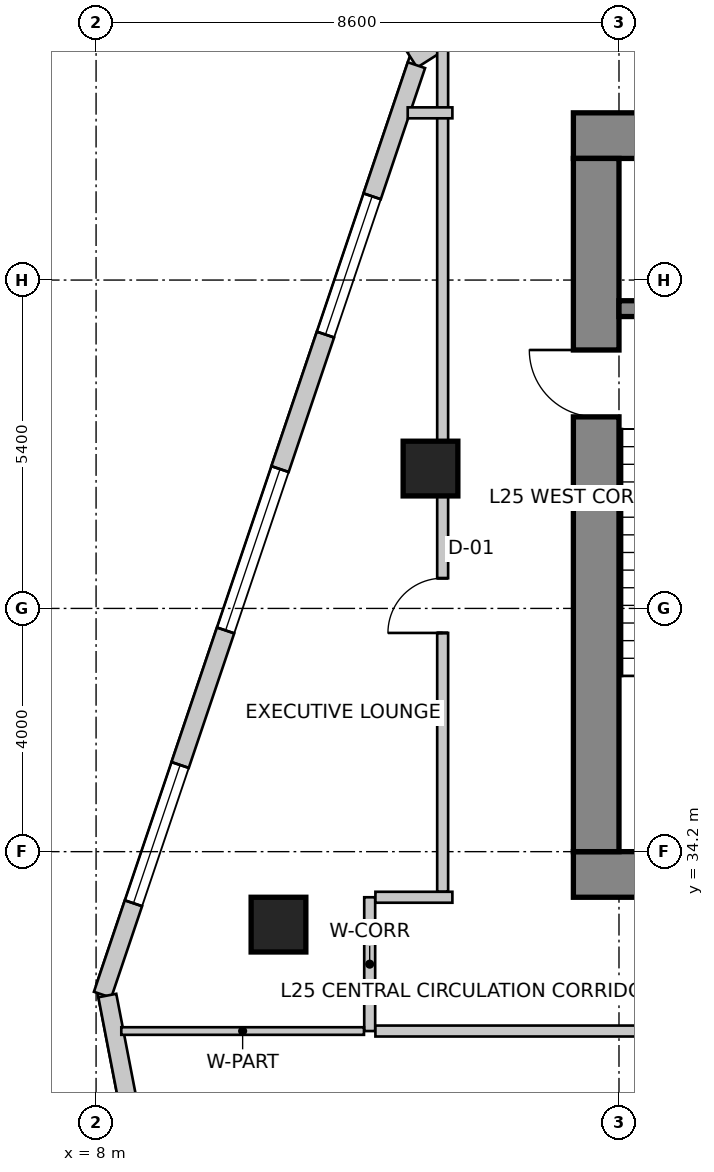
"""IFC4 building model, lengths in metres.
Left out: names, types, materials, properties, quantities, classifications, styles, units other than length and angle.
Written with IfcOpenShell. Run it as: python <this file> out.ifc"""

import sys

from ifc_helpers import new_model, si_unit, direction, frame, frame_2d, origin, origin_2d, place, context, subcontext, project, spatial, rectangle, extrude, source, transform, mapped, element, fill, save


model = new_model("IFC4")
c1 = context("Model", 3, precision=1e-05, world=origin(), true_north=direction((0.0, 1.0)))
c2 = subcontext(c1, "Body", "Model", "MODEL_VIEW")
j1 = project(units=[si_unit("LENGTHUNIT", "METRE"), si_unit("PLANEANGLEUNIT", "RADIAN")], contexts=[c1])
p1 = place(None, origin())
s1 = spatial("IfcSite", under=j1, at=p1, CompositionType="ELEMENT")
p2 = place(p1, origin())
s2 = spatial("IfcBuilding", under=s1, at=p2, CompositionType="ELEMENT")
p3 = place(p2, frame((0.0, 0.0, 105.4)))
s3 = spatial("IfcBuildingStorey", under=s2, at=p3, CompositionType="ELEMENT", Elevation=105.4)
p4 = place(p3, frame((15.85, 45.975, 0.0), z_axis=(0.0, 0.0, 1.0), x_axis=(1.0, 0.0, 0.0)))
e1 = element("IfcWall", 1, at=p4, inside=s3, PredefinedType="SHEAR", context=c2, shape_type="SweptSolid", body=[
    extrude(rectangle(XDim=15.9, YDim=0.75, at=frame_2d((7.95, 0.0))), origin(), (0.0, 0.0, 1.0), 5.2),
])
p5 = place(p3, frame((15.85, 33.825, 0.0), z_axis=(0.0, 0.0, 1.0), x_axis=(1.0, 0.0, 0.0)))
e2 = element("IfcWall", 2, at=p5, inside=s3, PredefinedType="SHEAR", context=c2, shape_type="SweptSolid", body=[
    extrude(rectangle(XDim=15.9, YDim=0.75, at=frame_2d((7.95, 0.0))), origin(), (0.0, 0.0, 1.0), 5.2),
])
m1 = source(origin(), c2, "Body", "SweptSolid", [
    extrude(rectangle(XDim=1.3, YDim=2.15, at=frame_2d((0.65, 1.075))), frame((0.0, 0.385, 0.0), z_axis=(0.0, -1.0, 0.0), x_axis=(1.0, 0.0, 0.0)), (0.0, 0.0, 1.0), 0.77),
])
p6 = place(p5, frame((10.08, 0.0, 0.0)))
e3 = element("IfcOpeningElement", 3, at=p6, cuts=e2, PredefinedType="OPENING", context=c2, shape_type="MappedRepresentation", body=[
    mapped(m1, transform((0.0, 0.0, 0.0), scale=1.0)),
])
p7 = place(p3, frame((16.225, 34.2, 0.0), z_axis=(0.0, 0.0, 1.0), x_axis=(0.0, 1.0, 0.0)))
e4 = element("IfcWall", 4, at=p7, inside=s3, PredefinedType="SHEAR", context=c2, shape_type="SweptSolid", body=[
    extrude(rectangle(XDim=11.4, YDim=0.75, at=frame_2d((5.7, 0.0))), origin(), (0.0, 0.0, 1.0), 5.2),
])
m2 = source(origin(), c2, "Body", "SweptSolid", [
    extrude(rectangle(XDim=1.1, YDim=2.15, at=frame_2d((0.55, 1.075))), frame((0.0, 0.385, 0.0), z_axis=(0.0, -1.0, 0.0), x_axis=(1.0, 0.0, 0.0)), (0.0, 0.0, 1.0), 0.77),
])
p8 = place(p7, frame((7.15, 0.0, 0.0)))
e5 = element("IfcOpeningElement", 5, at=p8, cuts=e4, PredefinedType="OPENING", context=c2, shape_type="MappedRepresentation", body=[
    mapped(m2, transform((0.0, 0.0, 0.0), scale=1.0)),
])
p9 = place(p3, frame((16.6, 43.13, 0.0), z_axis=(0.0, 0.0, 1.0), x_axis=(1.0, 0.0, 0.0)))
e6 = element("IfcWall", 6, at=p9, inside=s3, PredefinedType="SHEAR", context=c2, shape_type="SweptSolid", body=[
    extrude(rectangle(XDim=3.5, YDim=0.26, at=frame_2d((1.75, 0.0))), origin(), (0.0, 0.0, 1.0), 5.2),
])
m3 = source(origin(), c2, "Body", "SweptSolid", [
    extrude(rectangle(XDim=0.9, YDim=0.9, at=origin_2d()), origin(), (0.0, 0.0, 1.0), 5.2),
])
for number, where, z_axis, x_axis in (
    (7, (11.0, 33.0, 0.0), (0.0, 0.0, 1.0), (1.0, 0.0, 0.0)),
    (8, (13.5, 40.5, 0.0), (0.0, 0.0, 1.0), (1.0, 0.0, 0.0)),
):
    element("IfcColumn", number, at=place(p3, frame(where, z_axis=z_axis, x_axis=x_axis)), inside=s3, PredefinedType="COLUMN", context=c2, shape_type="MappedRepresentation", body=[
        mapped(m3, transform((0.0, 0.0, 0.0), scale=1.0)),
    ])
p10 = place(p3, frame((21.875, 52.742, 0.0), z_axis=(0.0, 0.0, 1.0), x_axis=(-0.843662465249, -0.536873956092, 0.0)))
e9 = element("IfcWall", 9, at=p10, inside=s3, PredefinedType="SOLIDWALL", context=c2, shape_type="SweptSolid", body=[
    extrude(rectangle(XDim=10.284, YDim=0.3, at=frame_2d((5.142, 0.0))), origin(), (0.0, 0.0, 1.0), 4.95),
])
m4 = source(origin(), c2, "Body", "SweptSolid", [
    extrude(rectangle(XDim=2.8, YDim=2.4, at=frame_2d((1.4, 1.2))), frame((0.0, 0.16, 0.0), z_axis=(0.0, -1.0, 0.0), x_axis=(1.0, 0.0, 0.0)), (0.0, 0.0, 1.0), 0.32),
])
p11 = place(p10, frame((2.456, 0.0, 0.85)))
e10 = element("IfcOpeningElement", 10, at=p11, cuts=e9, PredefinedType="OPENING", context=c2, shape_type="MappedRepresentation", body=[
    mapped(m4, transform((0.0, 0.0, 0.0), scale=1.0)),
])
m5 = source(origin(), c2, "Body", "SweptSolid", [
    extrude(rectangle(XDim=1.5, YDim=1.8, at=frame_2d((0.75, 0.9))), frame((0.0, 0.16, 0.0), z_axis=(0.0, -1.0, 0.0), x_axis=(1.0, 0.0, 0.0)), (0.0, 0.0, 1.0), 0.32),
])
p12 = place(p10, frame((7.937, 0.0, 0.85)))
e11 = element("IfcOpeningElement", 11, at=p12, cuts=e9, PredefinedType="OPENING", context=c2, shape_type="MappedRepresentation", body=[
    mapped(m5, transform((0.0, 0.0, 0.0), scale=1.0)),
])
p13 = place(p3, frame((13.269, 47.134, 0.0), z_axis=(0.0, 0.0, 1.0), x_axis=(-0.319929596295, -0.947441319246, 0.0)))
e12 = element("IfcWall", 12, at=p13, inside=s3, PredefinedType="SOLIDWALL", context=c2, shape_type="SweptSolid", body=[
    extrude(rectangle(XDim=16.134, YDim=0.3, at=frame_2d((8.067, 0.0))), origin(), (0.0, 0.0, 1.0), 4.95),
])
m6 = source(origin(), c2, "Body", "SweptSolid", [
    extrude(rectangle(XDim=2.4, YDim=2.2, at=frame_2d((1.2, 1.1))), frame((0.0, 0.16, 0.0), z_axis=(0.0, -1.0, 0.0), x_axis=(1.0, 0.0, 0.0)), (0.0, 0.0, 1.0), 0.32),
])
p14 = place(p13, frame((2.276, 0.0, 0.85)))
e13 = element("IfcOpeningElement", 13, at=p14, cuts=e12, PredefinedType="OPENING", context=c2, shape_type="MappedRepresentation", body=[
    mapped(m6, transform((0.0, 0.0, 0.0), scale=1.0)),
])
p15 = place(p13, frame((7.011, 0.0, 0.85)))
e14 = element("IfcOpeningElement", 14, at=p15, cuts=e12, PredefinedType="OPENING", context=c2, shape_type="MappedRepresentation", body=[
    mapped(m4, transform((0.0, 0.0, 0.0), scale=1.0)),
])
p16 = place(p13, frame((12.147, 0.0, 0.85)))
e15 = element("IfcOpeningElement", 15, at=p16, cuts=e12, PredefinedType="OPENING", context=c2, shape_type="MappedRepresentation", body=[
    mapped(m6, transform((0.0, 0.0, 0.0), scale=1.0)),
])
p17 = place(p3, frame((8.185, 31.834, 0.0), z_axis=(0.0, 0.0, 1.0), x_axis=(0.189707113148, -0.981840725994, 0.0)))
e16 = element("IfcWall", 16, at=p17, inside=s3, PredefinedType="SOLIDWALL", context=c2, shape_type="SweptSolid", body=[
    extrude(rectangle(XDim=21.221, YDim=0.3, at=frame_2d((10.611, 0.0))), origin(), (0.0, 0.0, 1.0), 4.95),
])
p18 = place(p17, frame((2.145, 0.0, 0.85)))
e17 = element("IfcOpeningElement", 17, at=p18, cuts=e16, PredefinedType="OPENING", context=c2, shape_type="MappedRepresentation", body=[
    mapped(m4, transform((0.0, 0.0, 0.0), scale=1.0)),
])
p19 = place(p17, frame((7.761, 0.0, 0.85)))
e18 = element("IfcOpeningElement", 18, at=p19, cuts=e16, PredefinedType="OPENING", context=c2, shape_type="MappedRepresentation", body=[
    mapped(m6, transform((0.0, 0.0, 0.0), scale=1.0)),
])
p20 = place(p17, frame((12.977, 0.0, 0.85)))
e19 = element("IfcOpeningElement", 19, at=p20, cuts=e16, PredefinedType="OPENING", context=c2, shape_type="MappedRepresentation", body=[
    mapped(m4, transform((0.0, 0.0, 0.0), scale=1.0)),
])
p21 = place(p17, frame((17.813, 0.0, 0.85)))
e20 = element("IfcOpeningElement", 20, at=p21, cuts=e16, PredefinedType="OPENING", context=c2, shape_type="MappedRepresentation", body=[
    mapped(m4, transform((0.0, 0.0, 0.0), scale=1.0)),
])
p22 = place(p3, frame((12.5, 31.25, 0.0), z_axis=(0.0, 0.0, 1.0), x_axis=(0.0, 1.0, 0.0)))
e21 = element("IfcWall", 21, at=p22, inside=s3, PredefinedType="PARTITIONING", context=c2, shape_type="SweptSolid", body=[
    extrude(rectangle(XDim=2.2, YDim=0.18, at=frame_2d((1.1, 0.0))), origin(), (0.0, 0.0, 1.0), 4.619),
])
p23 = place(p3, frame((12.594, 33.45, 0.0), z_axis=(0.0, 0.0, 1.0), x_axis=(1.0, 0.0, 0.0)))
e22 = element("IfcWall", 22, at=p23, inside=s3, PredefinedType="PARTITIONING", context=c2, shape_type="SweptSolid", body=[
    extrude(rectangle(XDim=1.266, YDim=0.18, at=frame_2d((0.633, 0.0))), origin(), (0.0, 0.0, 1.0), 4.95),
])
p24 = place(p3, frame((26.76, 31.25, 0.0), z_axis=(0.0, 0.0, 1.0), x_axis=(-1.0, 0.0, 0.0)))
e23 = element("IfcWall", 23, at=p24, inside=s3, PredefinedType="PARTITIONING", context=c2, shape_type="SweptSolid", body=[
    extrude(rectangle(XDim=14.166, YDim=0.18, at=frame_2d((7.083, 0.0))), origin(), (0.0, 0.0, 1.0), 4.619),
])
m7 = source(origin(), c2, "Body", "SweptSolid", [
    extrude(rectangle(XDim=1.6, YDim=2.15, at=frame_2d((0.8, 1.075))), frame((0.0, 0.1, 0.0), z_axis=(0.0, -1.0, 0.0), x_axis=(1.0, 0.0, 0.0)), (0.0, 0.0, 1.0), 0.2),
])
p25 = place(p24, frame((6.283, 0.0, 0.0)))
e24 = element("IfcOpeningElement", 24, at=p25, cuts=e23, PredefinedType="OPENING", context=c2, shape_type="MappedRepresentation", body=[
    mapped(m7, transform((0.0, 0.0, 0.0), scale=1.0)),
])
p26 = place(p3, frame((13.7, 33.544, 0.0), z_axis=(0.0, 0.0, 1.0), x_axis=(0.0, 1.0, 0.0)))
e25 = element("IfcWall", 25, at=p26, inside=s3, PredefinedType="PARTITIONING", context=c2, shape_type="SweptSolid", body=[
    extrude(rectangle(XDim=13.86, YDim=0.18, at=frame_2d((6.93, 0.0))), origin(), (0.0, 0.0, 1.0), 4.092),
])
m8 = source(origin(), c2, "Body", "SweptSolid", [
    extrude(rectangle(XDim=0.9, YDim=2.15, at=frame_2d((0.45, 1.075))), frame((0.0, 0.1, 0.0), z_axis=(0.0, -1.0, 0.0), x_axis=(1.0, 0.0, 0.0)), (0.0, 0.0, 1.0), 0.2),
])
p27 = place(p26, frame((4.253, 0.0, 0.0)))
e26 = element("IfcOpeningElement", 26, at=p27, cuts=e25, PredefinedType="OPENING", context=c2, shape_type="MappedRepresentation", body=[
    mapped(m8, transform((0.0, 0.0, 0.0), scale=1.0)),
])
p28 = place(p3, frame((13.86, 46.35, 0.0), z_axis=(0.0, 0.0, 1.0), x_axis=(-1.0, 0.0, 0.0)))
e27 = element("IfcWall", 27, at=p28, inside=s3, PredefinedType="PARTITIONING", context=c2, shape_type="SweptSolid", body=[
    extrude(rectangle(XDim=0.735, YDim=0.18, at=frame_2d((0.367, 0.0))), origin(), (0.0, 0.0, 1.0), 4.95),
])
p29 = place(p3, frame((12.406, 31.25, 0.0), z_axis=(0.0, 0.0, 1.0), x_axis=(-1.0, 0.0, 0.0)))
e28 = element("IfcWall", 28, at=p29, inside=s3, PredefinedType="PARTITIONING", context=c2, shape_type="SweptSolid", body=[
    extrude(rectangle(XDim=3.991, YDim=0.125, at=frame_2d((1.996, 0.0))), origin(), (0.0, 0.0, 1.0), 4.092),
])
m9 = source(origin(), c2, "Body", "SweptSolid", [
    extrude(rectangle(XDim=2.4, YDim=2.2, at=frame_2d((1.2, 1.1))), frame((0.0, -0.015, 0.0), z_axis=(0.0, -1.0, 0.0), x_axis=(1.0, 0.0, 0.0)), (0.0, 0.0, 1.0), 0.06),
])
p30 = place(p14, origin())
e29 = element("IfcWindow", 29, at=p30, inside=s3, PartitioningType="SINGLE_PANEL", PredefinedType="WINDOW", context=c2, shape_type="MappedRepresentation", body=[
    mapped(m9, transform((0.0, 0.0, 0.0), scale=1.0)),
])
fill(e13, e29)
m10 = source(origin(), c2, "Body", "SweptSolid", [
    extrude(rectangle(XDim=2.8, YDim=2.4, at=frame_2d((1.4, 1.2))), frame((0.0, -0.015, 0.0), z_axis=(0.0, -1.0, 0.0), x_axis=(1.0, 0.0, 0.0)), (0.0, 0.0, 1.0), 0.06),
])
p31 = place(p15, origin())
e30 = element("IfcWindow", 30, at=p31, inside=s3, PartitioningType="SINGLE_PANEL", PredefinedType="WINDOW", context=c2, shape_type="MappedRepresentation", body=[
    mapped(m10, transform((0.0, 0.0, 0.0), scale=1.0)),
])
fill(e14, e30)
p32 = place(p16, origin())
e31 = element("IfcWindow", 31, at=p32, inside=s3, PartitioningType="SINGLE_PANEL", PredefinedType="WINDOW", context=c2, shape_type="MappedRepresentation", body=[
    mapped(m9, transform((0.0, 0.0, 0.0), scale=1.0)),
])
fill(e15, e31)
m11 = source(origin(), c2, "Body", "SweptSolid", [
    extrude(rectangle(XDim=1.1, YDim=2.15, at=frame_2d((0.55, 1.075))), frame((0.0, 0.025, 0.0), z_axis=(0.0, -1.0, 0.0), x_axis=(1.0, 0.0, 0.0)), (0.0, 0.0, 1.0), 0.05),
])
p33 = place(p8, origin())
e32 = element("IfcDoor", 32, at=p33, inside=s3, OperationType="SINGLE_SWING_RIGHT", PredefinedType="DOOR", context=c2, shape_type="MappedRepresentation", body=[
    mapped(m11, transform((0.0, 0.0, 0.0), scale=1.0)),
])
fill(e5, e32)
m12 = source(origin(), c2, "Body", "SweptSolid", [
    extrude(rectangle(XDim=0.9, YDim=2.15, at=frame_2d((0.45, 1.075))), frame((0.0, 0.025, 0.0), z_axis=(0.0, -1.0, 0.0), x_axis=(1.0, 0.0, 0.0)), (0.0, 0.0, 1.0), 0.05),
])
p34 = place(p27, origin())
e33 = element("IfcDoor", 33, at=p34, inside=s3, OperationType="SINGLE_SWING_LEFT", PredefinedType="DOOR", context=c2, shape_type="MappedRepresentation", body=[
    mapped(m12, transform((0.0, 0.0, 0.0), scale=1.0)),
])
fill(e26, e33)
save(model, sys.argv[1])
